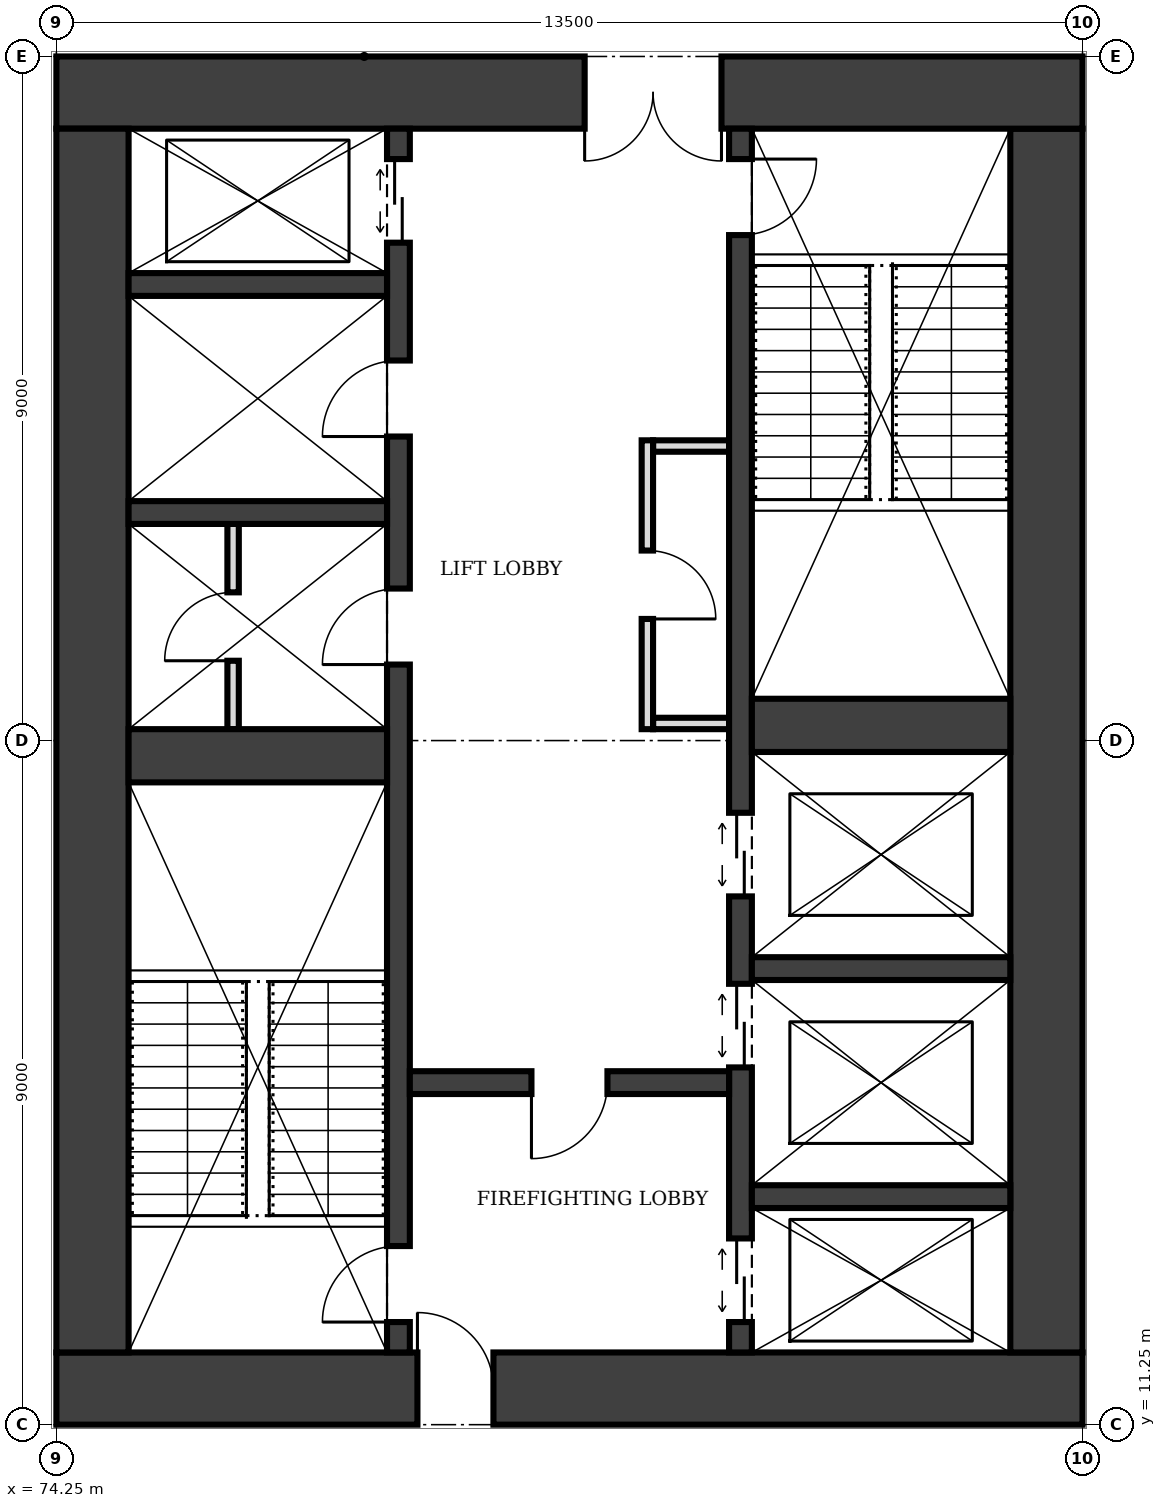
"""IFC4 building model, lengths in metres.
Left out: names, types, materials, properties, quantities, classifications, styles, units other than length and angle.
Written with IfcOpenShell. Run it as: python <this file> out.ifc"""

import sys

from ifc_helpers import new_model, si_unit, direction, frame, frame_2d, origin, place, context, subcontext, project, spatial, rectangle, extrude, element, fill, save


model = new_model("IFC4")
c1 = context("Model", 3, precision=1e-05, world=origin(), true_north=direction((0.0, 1.0)))
c2 = subcontext(c1, "Body", "Model", "MODEL_VIEW")
j1 = project(units=[si_unit("LENGTHUNIT", "METRE"), si_unit("PLANEANGLEUNIT", "RADIAN")], contexts=[c1])
p1 = place(None, origin())
s1 = spatial("IfcSite", under=j1, at=p1, CompositionType="ELEMENT")
p2 = place(p1, origin())
s2 = spatial("IfcBuilding", under=s1, at=p2, CompositionType="ELEMENT")
p3 = place(p2, frame((0.0, 0.0, 133.0)))
s3 = spatial("IfcBuildingStorey", under=s2, at=p3, CompositionType="ELEMENT", Elevation=133.0)
p4 = place(p3, frame((74.25, 11.725, 0.0), z_axis=(0.0, 0.0, 1.0), x_axis=(1.0, 0.0, 0.0)))
e1 = element("IfcWall", 1, at=p4, inside=s3, PredefinedType="SHEAR", context=c2, shape_type="SweptSolid", body=[
    extrude(rectangle(XDim=13.5, YDim=0.95, at=frame_2d((6.75, 0.0))), origin(), (0.0, 0.0, 1.0), 4.0),
])
p5 = place(p4, frame((4.75, 0.0, 0.0)))
e2 = element("IfcOpeningElement", 2, at=p5, cuts=e1, PredefinedType="OPENING", context=c2, shape_type="SweptSolid", body=[
    extrude(rectangle(XDim=1.0, YDim=2.1, at=frame_2d((0.5, 1.05))), frame((0.0, 0.485, 0.0), z_axis=(0.0, -1.0, 0.0), x_axis=(1.0, 0.0, 0.0)), (0.0, 0.0, 1.0), 0.97),
])
p6 = place(p3, frame((87.275, 12.2, 0.0), z_axis=(0.0, 0.0, 1.0), x_axis=(0.0, 1.0, 0.0)))
e3 = element("IfcWall", 3, at=p6, inside=s3, PredefinedType="SHEAR", context=c2, shape_type="SweptSolid", body=[
    extrude(rectangle(XDim=16.1, YDim=0.95, at=frame_2d((8.05, 0.0))), origin(), (0.0, 0.0, 1.0), 4.0),
])
p7 = place(p3, frame((87.75, 28.775, 0.0), z_axis=(0.0, 0.0, 1.0), x_axis=(-1.0, 0.0, 0.0)))
e4 = element("IfcWall", 4, at=p7, inside=s3, PredefinedType="SHEAR", context=c2, shape_type="SweptSolid", body=[
    extrude(rectangle(XDim=13.5, YDim=0.95, at=frame_2d((6.75, 0.0))), origin(), (0.0, 0.0, 1.0), 4.0),
])
p8 = place(p7, frame((4.75, 0.0, 0.0)))
e5 = element("IfcOpeningElement", 5, at=p8, cuts=e4, PredefinedType="OPENING", context=c2, shape_type="SweptSolid", body=[
    extrude(rectangle(XDim=1.8, YDim=2.1, at=frame_2d((0.9, 1.05))), frame((0.0, 0.485, 0.0), z_axis=(0.0, -1.0, 0.0), x_axis=(1.0, 0.0, 0.0)), (0.0, 0.0, 1.0), 0.97),
])
p9 = place(p3, frame((74.725, 28.3, 0.0), z_axis=(0.0, 0.0, 1.0), x_axis=(0.0, -1.0, 0.0)))
e6 = element("IfcWall", 6, at=p9, inside=s3, PredefinedType="SHEAR", context=c2, shape_type="SweptSolid", body=[
    extrude(rectangle(XDim=16.1, YDim=0.95, at=frame_2d((8.05, 0.0))), origin(), (0.0, 0.0, 1.0), 4.0),
])
p10 = place(p3, frame((78.75, 12.2, 0.0), z_axis=(0.0, 0.0, 1.0), x_axis=(0.0, 1.0, 0.0)))
e7 = element("IfcWall", 7, at=p10, inside=s3, PredefinedType="SHEAR", context=c2, shape_type="SweptSolid", body=[
    extrude(rectangle(XDim=16.1, YDim=0.3, at=frame_2d((8.05, 0.0))), origin(), (0.0, 0.0, 1.0), 4.0),
])
p11 = place(p10, frame((0.4, 0.0, 0.0)))
e8 = element("IfcOpeningElement", 8, at=p11, cuts=e7, PredefinedType="OPENING", context=c2, shape_type="SweptSolid", body=[
    extrude(rectangle(XDim=1.0, YDim=2.1, at=frame_2d((0.5, 1.05))), frame((0.0, 0.16, 0.0), z_axis=(0.0, -1.0, 0.0), x_axis=(1.0, 0.0, 0.0)), (0.0, 0.0, 1.0), 0.32),
])
p12 = place(p10, frame((14.6, 0.0, 0.0)))
e9 = element("IfcOpeningElement", 9, at=p12, cuts=e7, PredefinedType="OPENING", context=c2, shape_type="SweptSolid", body=[
    extrude(rectangle(XDim=1.1, YDim=2.1, at=frame_2d((0.55, 1.05))), frame((0.0, 0.16, 0.0), z_axis=(0.0, -1.0, 0.0), x_axis=(1.0, 0.0, 0.0)), (0.0, 0.0, 1.0), 0.32),
])
p13 = place(p10, frame((9.05, 0.0, 0.0)))
e10 = element("IfcOpeningElement", 10, at=p13, cuts=e7, PredefinedType="OPENING", context=c2, shape_type="SweptSolid", body=[
    extrude(rectangle(XDim=1.0, YDim=2.1, at=frame_2d((0.5, 1.05))), frame((0.0, 0.16, 0.0), z_axis=(0.0, -1.0, 0.0), x_axis=(1.0, 0.0, 0.0)), (0.0, 0.0, 1.0), 0.32),
])
p14 = place(p10, frame((12.05, 0.0, 0.0)))
e11 = element("IfcOpeningElement", 11, at=p14, cuts=e7, PredefinedType="OPENING", context=c2, shape_type="SweptSolid", body=[
    extrude(rectangle(XDim=1.0, YDim=2.1, at=frame_2d((0.5, 1.05))), frame((0.0, 0.16, 0.0), z_axis=(0.0, -1.0, 0.0), x_axis=(1.0, 0.0, 0.0)), (0.0, 0.0, 1.0), 0.32),
])
p15 = place(p3, frame((83.25, 12.2, 0.0), z_axis=(0.0, 0.0, 1.0), x_axis=(0.0, 1.0, 0.0)))
e12 = element("IfcWall", 12, at=p15, inside=s3, PredefinedType="SHEAR", context=c2, shape_type="SweptSolid", body=[
    extrude(rectangle(XDim=16.1, YDim=0.3, at=frame_2d((8.05, 0.0))), origin(), (0.0, 0.0, 1.0), 4.0),
])
p16 = place(p15, frame((14.7, 0.0, 0.0)))
e13 = element("IfcOpeningElement", 13, at=p16, cuts=e12, PredefinedType="OPENING", context=c2, shape_type="SweptSolid", body=[
    extrude(rectangle(XDim=1.0, YDim=2.1, at=frame_2d((0.5, 1.05))), frame((0.0, 0.16, 0.0), z_axis=(0.0, -1.0, 0.0), x_axis=(1.0, 0.0, 0.0)), (0.0, 0.0, 1.0), 0.32),
])
p17 = place(p15, frame((0.4, 0.0, 0.0)))
e14 = element("IfcOpeningElement", 14, at=p17, cuts=e12, PredefinedType="OPENING", context=c2, shape_type="SweptSolid", body=[
    extrude(rectangle(XDim=1.1, YDim=2.1, at=frame_2d((0.55, 1.05))), frame((0.0, 0.16, 0.0), z_axis=(0.0, -1.0, 0.0), x_axis=(1.0, 0.0, 0.0)), (0.0, 0.0, 1.0), 0.32),
])
p18 = place(p15, frame((3.75, 0.0, 0.0)))
e15 = element("IfcOpeningElement", 15, at=p18, cuts=e12, PredefinedType="OPENING", context=c2, shape_type="SweptSolid", body=[
    extrude(rectangle(XDim=1.1, YDim=2.1, at=frame_2d((0.55, 1.05))), frame((0.0, 0.16, 0.0), z_axis=(0.0, -1.0, 0.0), x_axis=(1.0, 0.0, 0.0)), (0.0, 0.0, 1.0), 0.32),
])
p19 = place(p15, frame((6.0, 0.0, 0.0)))
e16 = element("IfcOpeningElement", 16, at=p19, cuts=e12, PredefinedType="OPENING", context=c2, shape_type="SweptSolid", body=[
    extrude(rectangle(XDim=1.1, YDim=2.1, at=frame_2d((0.55, 1.05))), frame((0.0, 0.16, 0.0), z_axis=(0.0, -1.0, 0.0), x_axis=(1.0, 0.0, 0.0)), (0.0, 0.0, 1.0), 0.32),
])
p20 = place(p3, frame((75.2, 20.05, 0.0), z_axis=(0.0, 0.0, 1.0), x_axis=(1.0, 0.0, 0.0)))
e17 = element("IfcWall", 17, at=p20, inside=s3, PredefinedType="SHEAR", context=c2, shape_type="SweptSolid", body=[
    extrude(rectangle(XDim=3.4, YDim=0.7, at=frame_2d((1.7, 0.0))), origin(), (0.0, 0.0, 1.0), 4.0),
])
p21 = place(p3, frame((78.9, 15.75, 0.0), z_axis=(0.0, 0.0, 1.0), x_axis=(1.0, 0.0, 0.0)))
e18 = element("IfcWall", 18, at=p21, inside=s3, PredefinedType="SHEAR", context=c2, shape_type="SweptSolid", body=[
    extrude(rectangle(XDim=4.2, YDim=0.3, at=frame_2d((2.1, 0.0))), origin(), (0.0, 0.0, 1.0), 4.0),
])
p22 = place(p21, frame((1.6, 0.0, 0.0)))
e19 = element("IfcOpeningElement", 19, at=p22, cuts=e18, PredefinedType="OPENING", context=c2, shape_type="SweptSolid", body=[
    extrude(rectangle(XDim=1.0, YDim=2.1, at=frame_2d((0.5, 1.05))), frame((0.0, 0.16, 0.0), z_axis=(0.0, -1.0, 0.0), x_axis=(1.0, 0.0, 0.0)), (0.0, 0.0, 1.0), 0.32),
])
for number, where, z_axis, x_axis in (
    (20, (83.4, 14.25, 0.0), (0.0, 0.0, 1.0), (1.0, 0.0, 0.0)),
    (21, (83.4, 17.25, 0.0), (0.0, 0.0, 1.0), (1.0, 0.0, 0.0)),
):
    element("IfcWall", number, at=place(p3, frame(where, z_axis=z_axis, x_axis=x_axis)), inside=s3, PredefinedType="SHEAR", context=c2, shape_type="SweptSolid", body=[
        extrude(rectangle(XDim=3.4, YDim=0.3, at=frame_2d((1.7, 0.0))), origin(), (0.0, 0.0, 1.0), 4.0),
    ])
p23 = place(p3, frame((83.4, 20.45, 0.0), z_axis=(0.0, 0.0, 1.0), x_axis=(1.0, 0.0, 0.0)))
e22 = element("IfcWall", 22, at=p23, inside=s3, PredefinedType="SHEAR", context=c2, shape_type="SweptSolid", body=[
    extrude(rectangle(XDim=3.4, YDim=0.7, at=frame_2d((1.7, 0.0))), origin(), (0.0, 0.0, 1.0), 4.0),
])
for number, where, z_axis, x_axis in (
    (23, (75.2, 23.25, 0.0), (0.0, 0.0, 1.0), (1.0, 0.0, 0.0)),
    (24, (75.2, 26.25, 0.0), (0.0, 0.0, 1.0), (1.0, 0.0, 0.0)),
):
    element("IfcWall", number, at=place(p3, frame(where, z_axis=z_axis, x_axis=x_axis)), inside=s3, PredefinedType="SHEAR", context=c2, shape_type="SweptSolid", body=[
        extrude(rectangle(XDim=3.4, YDim=0.3, at=frame_2d((1.7, 0.0))), origin(), (0.0, 0.0, 1.0), 4.0),
    ])
p24 = place(p3, frame((82.025, 20.4, 0.0), z_axis=(0.0, 0.0, 1.0), x_axis=(0.0, 1.0, 0.0)))
e25 = element("IfcWall", 25, at=p24, inside=s3, PredefinedType="PARTITIONING", context=c2, shape_type="SweptSolid", body=[
    extrude(rectangle(XDim=3.8, YDim=0.15, at=frame_2d((1.9, 0.0))), origin(), (0.0, 0.0, 1.0), 3.75),
])
p25 = place(p24, frame((1.45, 0.0, 0.0)))
e26 = element("IfcOpeningElement", 26, at=p25, cuts=e25, PredefinedType="OPENING", context=c2, shape_type="SweptSolid", body=[
    extrude(rectangle(XDim=0.9, YDim=2.1, at=frame_2d((0.45, 1.05))), frame((0.0, 0.085, 0.0), z_axis=(0.0, -1.0, 0.0), x_axis=(1.0, 0.0, 0.0)), (0.0, 0.0, 1.0), 0.17),
])
for number, where, z_axis, x_axis in (
    (27, (82.1, 20.475, 0.0), (0.0, 0.0, 1.0), (1.0, 0.0, 0.0)),
    (28, (82.1, 24.125, 0.0), (0.0, 0.0, 1.0), (1.0, 0.0, 0.0)),
):
    element("IfcWall", number, at=place(p3, frame(where, z_axis=z_axis, x_axis=x_axis)), inside=s3, PredefinedType="PARTITIONING", context=c2, shape_type="SweptSolid", body=[
        extrude(rectangle(XDim=1.0, YDim=0.15, at=frame_2d((0.5, 0.0))), origin(), (0.0, 0.0, 1.0), 3.75),
    ])
p26 = place(p3, frame((76.575, 20.4, 0.0), z_axis=(0.0, 0.0, 1.0), x_axis=(0.0, 1.0, 0.0)))
e29 = element("IfcWall", 29, at=p26, inside=s3, PredefinedType="PARTITIONING", context=c2, shape_type="SweptSolid", body=[
    extrude(rectangle(XDim=2.7, YDim=0.15, at=frame_2d((1.35, 0.0))), origin(), (0.0, 0.0, 1.0), 3.75),
])
p27 = place(p26, frame((0.9, 0.0, 0.0)))
e30 = element("IfcOpeningElement", 30, at=p27, cuts=e29, PredefinedType="OPENING", context=c2, shape_type="SweptSolid", body=[
    extrude(rectangle(XDim=0.9, YDim=2.1, at=frame_2d((0.45, 1.05))), frame((0.0, 0.085, 0.0), z_axis=(0.0, -1.0, 0.0), x_axis=(1.0, 0.0, 0.0)), (0.0, 0.0, 1.0), 0.17),
])
p28 = place(p5, origin())
e31 = element("IfcDoor", 31, at=p28, inside=s3, OperationType="SINGLE_SWING_LEFT", PredefinedType="DOOR", context=c2, shape_type="SweptSolid", body=[
    extrude(rectangle(XDim=1.0, YDim=2.1, at=frame_2d((0.5, 1.05))), frame((0.0, 0.025, 0.0), z_axis=(0.0, -1.0, 0.0), x_axis=(1.0, 0.0, 0.0)), (0.0, 0.0, 1.0), 0.05),
])
fill(e2, e31)
p29 = place(p8, origin())
e32 = element("IfcDoor", 32, at=p29, inside=s3, OperationType="DOUBLE_DOOR_SINGLE_SWING", PredefinedType="DOOR", context=c2, shape_type="SweptSolid", body=[
    extrude(rectangle(XDim=1.8, YDim=2.1, at=frame_2d((0.9, 1.05))), frame((0.0, 0.025, 0.0), z_axis=(0.0, -1.0, 0.0), x_axis=(1.0, 0.0, 0.0)), (0.0, 0.0, 1.0), 0.05),
])
fill(e5, e32)
p30 = place(p22, frame((1.0, 0.0, 0.0), z_axis=(0.0, 0.0, 1.0), x_axis=(-1.0, 0.0, 0.0)))
e33 = element("IfcDoor", 33, at=p30, inside=s3, OperationType="SINGLE_SWING_RIGHT", PredefinedType="DOOR", context=c2, shape_type="SweptSolid", body=[
    extrude(rectangle(XDim=1.0, YDim=2.1, at=frame_2d((0.5, 1.05))), frame((0.0, 0.025, 0.0), z_axis=(0.0, -1.0, 0.0), x_axis=(1.0, 0.0, 0.0)), (0.0, 0.0, 1.0), 0.05),
])
fill(e19, e33)
p31 = place(p11, origin())
e34 = element("IfcDoor", 34, at=p31, inside=s3, OperationType="SINGLE_SWING_LEFT", PredefinedType="DOOR", context=c2, shape_type="SweptSolid", body=[
    extrude(rectangle(XDim=1.0, YDim=2.1, at=frame_2d((0.5, 1.05))), frame((0.0, 0.025, 0.0), z_axis=(0.0, -1.0, 0.0), x_axis=(1.0, 0.0, 0.0)), (0.0, 0.0, 1.0), 0.05),
])
fill(e8, e34)
p32 = place(p16, frame((1.0, 0.0, 0.0), z_axis=(0.0, 0.0, 1.0), x_axis=(-1.0, 0.0, 0.0)))
e35 = element("IfcDoor", 35, at=p32, inside=s3, OperationType="SINGLE_SWING_LEFT", PredefinedType="DOOR", context=c2, shape_type="SweptSolid", body=[
    extrude(rectangle(XDim=1.0, YDim=2.1, at=frame_2d((0.5, 1.05))), frame((0.0, 0.025, 0.0), z_axis=(0.0, -1.0, 0.0), x_axis=(1.0, 0.0, 0.0)), (0.0, 0.0, 1.0), 0.05),
])
fill(e13, e35)
p33 = place(p17, origin())
e36 = element("IfcDoor", 36, at=p33, inside=s3, OperationType="DOUBLE_DOOR_SLIDING", PredefinedType="DOOR", context=c2, shape_type="SweptSolid", body=[
    extrude(rectangle(XDim=1.1, YDim=2.1, at=frame_2d((0.55, 1.05))), frame((0.0, 0.025, 0.0), z_axis=(0.0, -1.0, 0.0), x_axis=(1.0, 0.0, 0.0)), (0.0, 0.0, 1.0), 0.05),
])
fill(e14, e36)
p34 = place(p12, origin())
e37 = element("IfcDoor", 37, at=p34, inside=s3, OperationType="DOUBLE_DOOR_SLIDING", PredefinedType="DOOR", context=c2, shape_type="SweptSolid", body=[
    extrude(rectangle(XDim=1.1, YDim=2.1, at=frame_2d((0.55, 1.05))), frame((0.0, 0.025, 0.0), z_axis=(0.0, -1.0, 0.0), x_axis=(1.0, 0.0, 0.0)), (0.0, 0.0, 1.0), 0.05),
])
fill(e9, e37)
p35 = place(p18, origin())
e38 = element("IfcDoor", 38, at=p35, inside=s3, OperationType="DOUBLE_DOOR_SLIDING", PredefinedType="DOOR", context=c2, shape_type="SweptSolid", body=[
    extrude(rectangle(XDim=1.1, YDim=2.1, at=frame_2d((0.55, 1.05))), frame((0.0, 0.025, 0.0), z_axis=(0.0, -1.0, 0.0), x_axis=(1.0, 0.0, 0.0)), (0.0, 0.0, 1.0), 0.05),
])
fill(e15, e38)
p36 = place(p19, origin())
e39 = element("IfcDoor", 39, at=p36, inside=s3, OperationType="DOUBLE_DOOR_SLIDING", PredefinedType="DOOR", context=c2, shape_type="SweptSolid", body=[
    extrude(rectangle(XDim=1.1, YDim=2.1, at=frame_2d((0.55, 1.05))), frame((0.0, 0.025, 0.0), z_axis=(0.0, -1.0, 0.0), x_axis=(1.0, 0.0, 0.0)), (0.0, 0.0, 1.0), 0.05),
])
fill(e16, e39)
p37 = place(p25, frame((0.9, 0.0, 0.0), z_axis=(0.0, 0.0, 1.0), x_axis=(-1.0, 0.0, 0.0)))
e40 = element("IfcDoor", 40, at=p37, inside=s3, OperationType="SINGLE_SWING_RIGHT", PredefinedType="DOOR", context=c2, shape_type="SweptSolid", body=[
    extrude(rectangle(XDim=0.9, YDim=2.1, at=frame_2d((0.45, 1.05))), frame((0.0, 0.025, 0.0), z_axis=(0.0, -1.0, 0.0), x_axis=(1.0, 0.0, 0.0)), (0.0, 0.0, 1.0), 0.05),
])
fill(e26, e40)
p38 = place(p13, origin())
e41 = element("IfcDoor", 41, at=p38, inside=s3, OperationType="SINGLE_SWING_LEFT", PredefinedType="DOOR", context=c2, shape_type="SweptSolid", body=[
    extrude(rectangle(XDim=1.0, YDim=2.1, at=frame_2d((0.5, 1.05))), frame((0.0, 0.025, 0.0), z_axis=(0.0, -1.0, 0.0), x_axis=(1.0, 0.0, 0.0)), (0.0, 0.0, 1.0), 0.05),
])
fill(e10, e41)
p39 = place(p27, origin())
e42 = element("IfcDoor", 42, at=p39, inside=s3, OperationType="SINGLE_SWING_LEFT", PredefinedType="DOOR", context=c2, shape_type="SweptSolid", body=[
    extrude(rectangle(XDim=0.9, YDim=2.1, at=frame_2d((0.45, 1.05))), frame((0.0, 0.025, 0.0), z_axis=(0.0, -1.0, 0.0), x_axis=(1.0, 0.0, 0.0)), (0.0, 0.0, 1.0), 0.05),
])
fill(e30, e42)
p40 = place(p14, origin())
e43 = element("IfcDoor", 43, at=p40, inside=s3, OperationType="SINGLE_SWING_LEFT", PredefinedType="DOOR", context=c2, shape_type="SweptSolid", body=[
    extrude(rectangle(XDim=1.0, YDim=2.1, at=frame_2d((0.5, 1.05))), frame((0.0, 0.025, 0.0), z_axis=(0.0, -1.0, 0.0), x_axis=(1.0, 0.0, 0.0)), (0.0, 0.0, 1.0), 0.05),
])
fill(e11, e43)
save(model, sys.argv[1])
